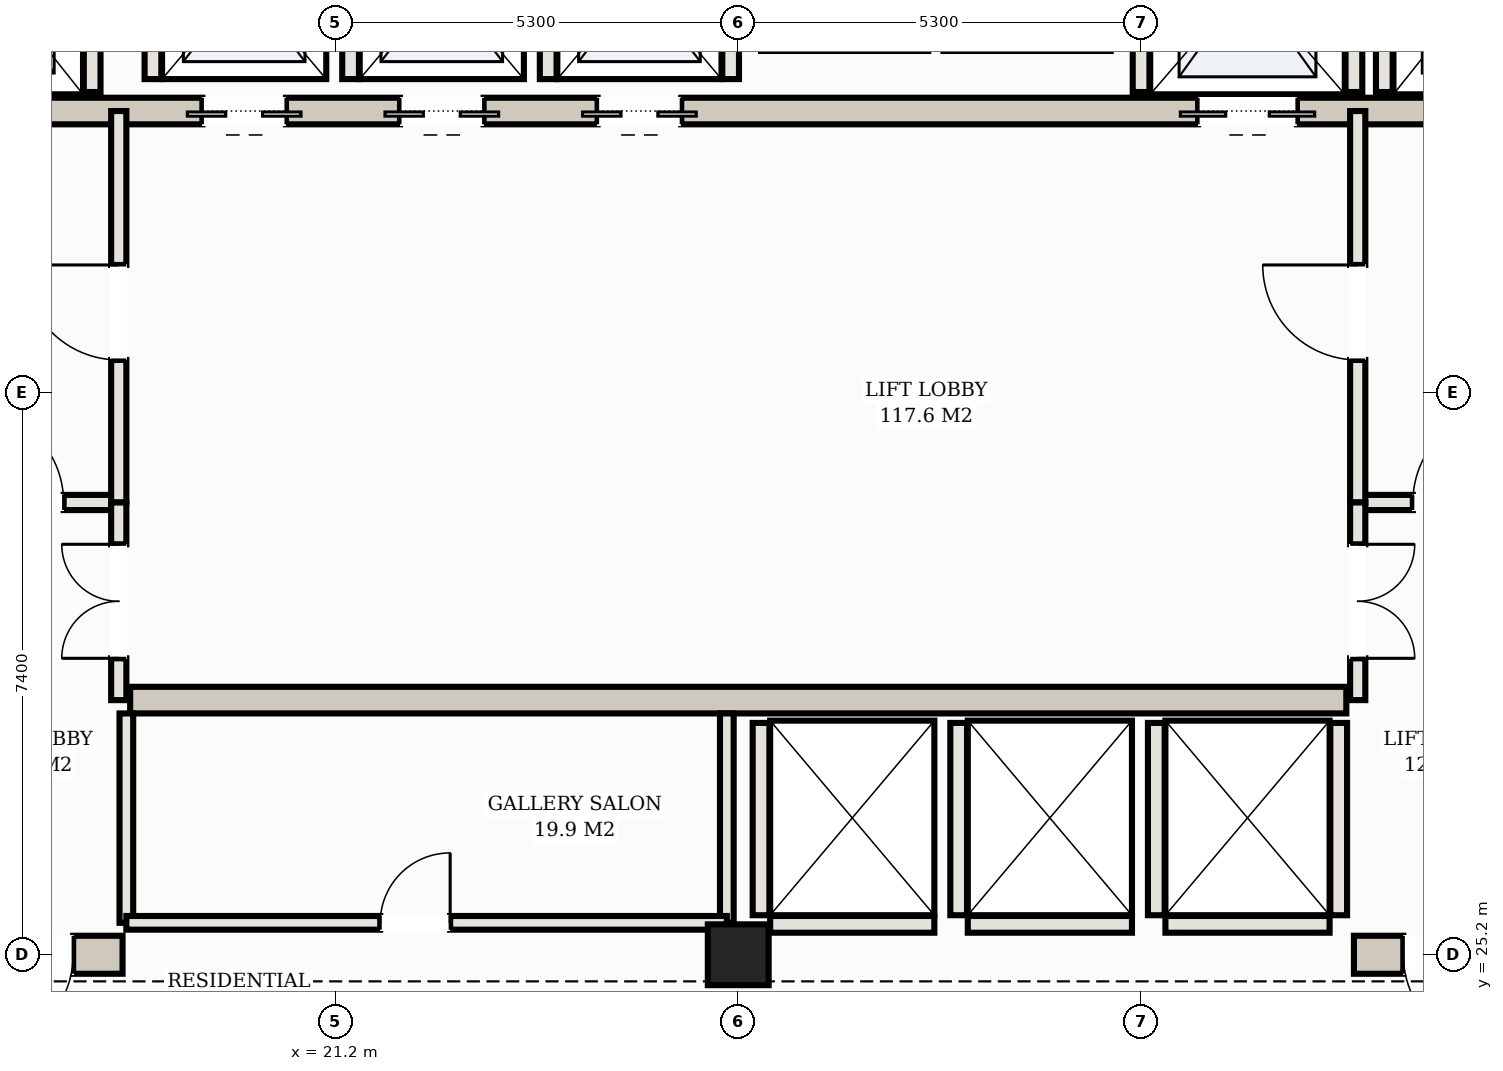
"""IFC4 building model, lengths in metres.
Left out: names, types, materials, properties, quantities, classifications, styles, units other than length and angle.
Written with IfcOpenShell. Run it as: python <this file> out.ifc"""

import sys

from ifc_helpers import new_model, si_unit, direction, frame, frame_2d, origin, origin_2d, place, context, subcontext, project, spatial, rectangle, hollow_rectangle, extrude, element, fill, save


model = new_model("IFC4")
c1 = context("Model", 3, precision=1e-05, world=origin(), true_north=direction((0.0, 1.0)))
c2 = subcontext(c1, "Body", "Model", "MODEL_VIEW")
j1 = project(units=[si_unit("LENGTHUNIT", "METRE"), si_unit("PLANEANGLEUNIT", "RADIAN")], contexts=[c1])
p1 = place(None, origin())
s1 = spatial("IfcSite", under=j1, at=p1, CompositionType="ELEMENT")
p2 = place(p1, origin())
s2 = spatial("IfcBuilding", under=s1, at=p2, CompositionType="ELEMENT")
p3 = place(p2, frame((0.0, 0.0, 196.7)))
s3 = spatial("IfcBuildingStorey", under=s2, at=p3, CompositionType="ELEMENT", Elevation=196.7)
p4 = place(p3, frame((10.35, 25.2, 0.0), z_axis=(0.0, 0.0, 1.0), x_axis=(1.0, 0.0, 0.0)))
e1 = element("IfcWall", 1, at=p4, inside=s3, PredefinedType="SHEAR", context=c2, shape_type="SweptSolid", body=[
    extrude(rectangle(XDim=8.05, YDim=0.5, at=frame_2d((4.025, 0.0))), origin(), (0.0, 0.0, 1.0), 3.11),
])
p5 = place(p4, frame((6.15, 0.0, 0.0)))
e2 = element("IfcOpeningElement", 2, at=p5, cuts=e1, PredefinedType="OPENING", context=c2, shape_type="SweptSolid", body=[
    extrude(rectangle(XDim=1.25, YDim=2.2, at=frame_2d((0.625, 1.1))), frame((0.0, 0.26, 0.0), z_axis=(0.0, -1.0, 0.0), x_axis=(1.0, 0.0, 0.0)), (0.0, 0.0, 1.0), 0.52),
])
p6 = place(p3, frame((34.6, 25.2, 0.0), z_axis=(0.0, 0.0, 1.0), x_axis=(1.0, 0.0, 0.0)))
e3 = element("IfcWall", 3, at=p6, inside=s3, PredefinedType="SHEAR", context=c2, shape_type="SweptSolid", body=[
    extrude(rectangle(XDim=8.05, YDim=0.5, at=frame_2d((4.025, 0.0))), origin(), (0.0, 0.0, 1.0), 3.11),
])
p7 = place(p6, frame((0.65, 0.0, 0.0)))
e4 = element("IfcOpeningElement", 4, at=p7, cuts=e3, PredefinedType="OPENING", context=c2, shape_type="SweptSolid", body=[
    extrude(rectangle(XDim=1.25, YDim=2.2, at=frame_2d((0.625, 1.1))), frame((0.0, 0.26, 0.0), z_axis=(0.0, -1.0, 0.0), x_axis=(1.0, 0.0, 0.0)), (0.0, 0.0, 1.0), 0.52),
])
p8 = place(p3, frame((15.5, 36.3, 0.0), z_axis=(0.0, 0.0, 1.0), x_axis=(1.0, 0.0, 0.0)))
e5 = element("IfcWall", 5, at=p8, inside=s3, PredefinedType="SHEAR", context=c2, shape_type="SweptSolid", body=[
    extrude(rectangle(XDim=22.0, YDim=0.35, at=frame_2d((11.0, 0.0))), origin(), (0.0, 0.0, 1.0), 3.11),
])
p9 = place(p8, frame((0.65, 0.0, 0.0)))
e6 = element("IfcOpeningElement", 6, at=p9, cuts=e5, PredefinedType="OPENING", context=c2, shape_type="SweptSolid", body=[
    extrude(rectangle(XDim=1.1, YDim=2.15, at=frame_2d((0.55, 1.075))), frame((0.0, 0.185, 0.0), z_axis=(0.0, -1.0, 0.0), x_axis=(1.0, 0.0, 0.0)), (0.0, 0.0, 1.0), 0.37),
])
p10 = place(p8, frame((20.25, 0.0, 0.0)))
e7 = element("IfcOpeningElement", 7, at=p10, cuts=e5, PredefinedType="OPENING", context=c2, shape_type="SweptSolid", body=[
    extrude(rectangle(XDim=1.1, YDim=2.15, at=frame_2d((0.55, 1.075))), frame((0.0, 0.185, 0.0), z_axis=(0.0, -1.0, 0.0), x_axis=(1.0, 0.0, 0.0)), (0.0, 0.0, 1.0), 0.37),
])
p11 = place(p8, frame((17.05, 0.0, 0.0)))
e8 = element("IfcOpeningElement", 8, at=p11, cuts=e5, PredefinedType="OPENING", context=c2, shape_type="SweptSolid", body=[
    extrude(rectangle(XDim=1.3, YDim=2.2, at=frame_2d((0.65, 1.1))), frame((0.0, 0.185, 0.0), z_axis=(0.0, -1.0, 0.0), x_axis=(1.0, 0.0, 0.0)), (0.0, 0.0, 1.0), 0.37),
])
p12 = place(p8, frame((3.95, 0.0, 0.0)))
e9 = element("IfcOpeningElement", 9, at=p12, cuts=e5, PredefinedType="OPENING", context=c2, shape_type="SweptSolid", body=[
    extrude(rectangle(XDim=1.1, YDim=2.15, at=frame_2d((0.55, 1.075))), frame((0.0, 0.185, 0.0), z_axis=(0.0, -1.0, 0.0), x_axis=(1.0, 0.0, 0.0)), (0.0, 0.0, 1.0), 0.37),
])
p13 = place(p8, frame((6.55, 0.0, 0.0)))
e10 = element("IfcOpeningElement", 10, at=p13, cuts=e5, PredefinedType="OPENING", context=c2, shape_type="SweptSolid", body=[
    extrude(rectangle(XDim=1.1, YDim=2.15, at=frame_2d((0.55, 1.075))), frame((0.0, 0.185, 0.0), z_axis=(0.0, -1.0, 0.0), x_axis=(1.0, 0.0, 0.0)), (0.0, 0.0, 1.0), 0.37),
])
p14 = place(p8, frame((9.15, 0.0, 0.0)))
e11 = element("IfcOpeningElement", 11, at=p14, cuts=e5, PredefinedType="OPENING", context=c2, shape_type="SweptSolid", body=[
    extrude(rectangle(XDim=1.1, YDim=2.15, at=frame_2d((0.55, 1.075))), frame((0.0, 0.185, 0.0), z_axis=(0.0, -1.0, 0.0), x_axis=(1.0, 0.0, 0.0)), (0.0, 0.0, 1.0), 0.37),
])
p15 = place(p3, frame((18.5, 28.55, 0.0), z_axis=(0.0, 0.0, 1.0), x_axis=(1.0, 0.0, 0.0)))
e12 = element("IfcWall", 12, at=p15, inside=s3, PredefinedType="SHEAR", context=c2, shape_type="SweptSolid", body=[
    extrude(rectangle(XDim=16.0, YDim=0.35, at=frame_2d((8.0, 0.0))), origin(), (0.0, 0.0, 1.0), 3.11),
])
p16 = place(p3, frame((26.5, 25.2, 0.0), z_axis=(0.0, 0.0, 1.0), x_axis=(1.0, 0.0, 0.0)))
e13 = element("IfcColumn", 13, at=p16, inside=s3, PredefinedType="COLUMN", context=c2, shape_type="SweptSolid", body=[
    extrude(hollow_rectangle(XDim=0.8, YDim=0.8, WallThickness=0.028, at=origin_2d()), origin(), (0.0, 0.0, 1.0), 3.3),
])
for number, where, z_axis, x_axis in (
    (14, (18.0, 36.55, 0.0), (0.0, 0.0, 1.0), (0.0, 1.0, 0.0)),
    (15, (35.0, 36.55, 0.0), (0.0, 0.0, 1.0), (0.0, 1.0, 0.0)),
    (16, (31.8, 36.55, 0.0), (0.0, 0.0, 1.0), (0.0, 1.0, 0.0)),
    (17, (34.6, 36.55, 0.0), (0.0, 0.0, 1.0), (0.0, 1.0, 0.0)),
):
    element("IfcWall", number, at=place(p3, frame(where, z_axis=z_axis, x_axis=x_axis)), inside=s3, PredefinedType="SOLIDWALL", context=c2, shape_type="SweptSolid", body=[
        extrude(rectangle(XDim=2.93, YDim=0.22, at=frame_2d((1.465, 0.0))), origin(), (0.0, 0.0, 1.0), 3.11),
    ])
p17 = place(p3, frame((26.8, 25.72, 0.0), z_axis=(0.0, 0.0, 1.0), x_axis=(0.0, 1.0, 0.0)))
e18 = element("IfcWall", 18, at=p17, inside=s3, PredefinedType="SOLIDWALL", context=c2, shape_type="SweptSolid", body=[
    extrude(rectangle(XDim=2.53, YDim=0.22, at=frame_2d((1.265, 0.0))), origin(), (0.0, 0.0, 1.0), 3.11),
])
p18 = place(p3, frame((26.92, 25.6, 0.0), z_axis=(0.0, 0.0, 1.0), x_axis=(1.0, 0.0, 0.0)))
e19 = element("IfcWall", 19, at=p18, inside=s3, PredefinedType="SOLIDWALL", context=c2, shape_type="SweptSolid", body=[
    extrude(rectangle(XDim=2.16, YDim=0.22, at=frame_2d((1.08, 0.0))), origin(), (0.0, 0.0, 1.0), 2.305),
])
p19 = place(p3, frame((29.4, 25.72, 0.0), z_axis=(0.0, 0.0, 1.0), x_axis=(0.0, 1.0, 0.0)))
e20 = element("IfcWall", 20, at=p19, inside=s3, PredefinedType="SOLIDWALL", context=c2, shape_type="SweptSolid", body=[
    extrude(rectangle(XDim=2.53, YDim=0.22, at=frame_2d((1.265, 0.0))), origin(), (0.0, 0.0, 1.0), 3.11),
])
p20 = place(p3, frame((29.52, 25.6, 0.0), z_axis=(0.0, 0.0, 1.0), x_axis=(1.0, 0.0, 0.0)))
e21 = element("IfcWall", 21, at=p20, inside=s3, PredefinedType="SOLIDWALL", context=c2, shape_type="SweptSolid", body=[
    extrude(rectangle(XDim=2.16, YDim=0.22, at=frame_2d((1.08, 0.0))), origin(), (0.0, 0.0, 1.0), 2.305),
])
for number, where, z_axis, x_axis in (
    (22, (32.0, 25.72, 0.0), (0.0, 0.0, 1.0), (0.0, 1.0, 0.0)),
    (23, (34.4, 25.72, 0.0), (0.0, 0.0, 1.0), (0.0, 1.0, 0.0)),
):
    element("IfcWall", number, at=place(p3, frame(where, z_axis=z_axis, x_axis=x_axis)), inside=s3, PredefinedType="SOLIDWALL", context=c2, shape_type="SweptSolid", body=[
        extrude(rectangle(XDim=2.53, YDim=0.22, at=frame_2d((1.265, 0.0))), origin(), (0.0, 0.0, 1.0), 3.11),
    ])
p21 = place(p3, frame((32.12, 25.6, 0.0), z_axis=(0.0, 0.0, 1.0), x_axis=(1.0, 0.0, 0.0)))
e24 = element("IfcWall", 24, at=p21, inside=s3, PredefinedType="SOLIDWALL", context=c2, shape_type="SweptSolid", body=[
    extrude(rectangle(XDim=2.16, YDim=0.22, at=frame_2d((1.08, 0.0))), origin(), (0.0, 0.0, 1.0), 2.305),
])
for number, where, z_axis, x_axis in (
    (25, (18.8, 36.72, 0.0), (0.0, 0.0, 1.0), (0.0, 1.0, 0.0)),
    (26, (21.4, 36.72, 0.0), (0.0, 0.0, 1.0), (0.0, 1.0, 0.0)),
    (27, (24.0, 36.72, 0.0), (0.0, 0.0, 1.0), (0.0, 1.0, 0.0)),
    (28, (26.4, 36.72, 0.0), (0.0, 0.0, 1.0), (0.0, 1.0, 0.0)),
):
    element("IfcWall", number, at=place(p3, frame(where, z_axis=z_axis, x_axis=x_axis)), inside=s3, PredefinedType="SOLIDWALL", context=c2, shape_type="SweptSolid", body=[
        extrude(rectangle(XDim=2.56, YDim=0.22, at=frame_2d((1.28, 0.0))), origin(), (0.0, 0.0, 1.0), 3.11),
    ])
p22 = place(p3, frame((15.1, 31.15, 0.0), z_axis=(0.0, 0.0, 1.0), x_axis=(1.0, 0.0, 0.0)))
e29 = element("IfcWall", 29, at=p22, inside=s3, PredefinedType="PARTITIONING", context=c2, shape_type="SweptSolid", body=[
    extrude(rectangle(XDim=3.25, YDim=0.2, at=frame_2d((1.625, 0.0))), origin(), (0.0, 0.0, 1.0), 2.43),
])
p23 = place(p22, frame((1.275, 0.0, 0.0)))
e30 = element("IfcOpeningElement", 30, at=p23, cuts=e29, PredefinedType="OPENING", context=c2, shape_type="SweptSolid", body=[
    extrude(rectangle(XDim=1.25, YDim=2.2, at=frame_2d((0.625, 1.1))), frame((0.0, 0.11, 0.0), z_axis=(0.0, -1.0, 0.0), x_axis=(1.0, 0.0, 0.0)), (0.0, 0.0, 1.0), 0.22),
])
p24 = place(p3, frame((18.35, 31.15, 0.0), z_axis=(0.0, 0.0, 1.0), x_axis=(0.0, 1.0, 0.0)))
e31 = element("IfcWall", 31, at=p24, inside=s3, PredefinedType="PARTITIONING", context=c2, shape_type="SweptSolid", body=[
    extrude(rectangle(XDim=5.15, YDim=0.2, at=frame_2d((2.575, 0.0))), origin(), (0.0, 0.0, 1.0), 2.43),
])
p25 = place(p24, frame((1.875, 0.0, 0.0)))
e32 = element("IfcOpeningElement", 32, at=p25, cuts=e31, PredefinedType="OPENING", context=c2, shape_type="SweptSolid", body=[
    extrude(rectangle(XDim=1.25, YDim=2.2, at=frame_2d((0.625, 1.1))), frame((0.0, 0.11, 0.0), z_axis=(0.0, -1.0, 0.0), x_axis=(1.0, 0.0, 0.0)), (0.0, 0.0, 1.0), 0.22),
])
p26 = place(p3, frame((34.65, 31.15, 0.0), z_axis=(0.0, 0.0, 1.0), x_axis=(1.0, 0.0, 0.0)))
e33 = element("IfcWall", 33, at=p26, inside=s3, PredefinedType="PARTITIONING", context=c2, shape_type="SweptSolid", body=[
    extrude(rectangle(XDim=3.25, YDim=0.2, at=frame_2d((1.625, 0.0))), origin(), (0.0, 0.0, 1.0), 2.43),
])
p27 = place(p26, frame((0.725, 0.0, 0.0)))
e34 = element("IfcOpeningElement", 34, at=p27, cuts=e33, PredefinedType="OPENING", context=c2, shape_type="SweptSolid", body=[
    extrude(rectangle(XDim=1.25, YDim=2.2, at=frame_2d((0.625, 1.1))), frame((0.0, 0.11, 0.0), z_axis=(0.0, -1.0, 0.0), x_axis=(1.0, 0.0, 0.0)), (0.0, 0.0, 1.0), 0.22),
])
p28 = place(p3, frame((34.65, 31.15, 0.0), z_axis=(0.0, 0.0, 1.0), x_axis=(0.0, 1.0, 0.0)))
e35 = element("IfcWall", 35, at=p28, inside=s3, PredefinedType="PARTITIONING", context=c2, shape_type="SweptSolid", body=[
    extrude(rectangle(XDim=5.15, YDim=0.2, at=frame_2d((2.575, 0.0))), origin(), (0.0, 0.0, 1.0), 2.43),
])
p29 = place(p28, frame((1.875, 0.0, 0.0)))
e36 = element("IfcOpeningElement", 36, at=p29, cuts=e35, PredefinedType="OPENING", context=c2, shape_type="SweptSolid", body=[
    extrude(rectangle(XDim=1.25, YDim=2.2, at=frame_2d((0.625, 1.1))), frame((0.0, 0.11, 0.0), z_axis=(0.0, -1.0, 0.0), x_axis=(1.0, 0.0, 0.0)), (0.0, 0.0, 1.0), 0.22),
])
p30 = place(p3, frame((18.35, 28.55, 0.0), z_axis=(0.0, 0.0, 1.0), x_axis=(0.0, 1.0, 0.0)))
e37 = element("IfcWall", 37, at=p30, inside=s3, PredefinedType="PARTITIONING", context=c2, shape_type="SweptSolid", body=[
    extrude(rectangle(XDim=2.6, YDim=0.2, at=frame_2d((1.3, 0.0))), origin(), (0.0, 0.0, 1.0), 2.43),
])
p31 = place(p30, frame((0.55, 0.0, 0.0)))
e38 = element("IfcOpeningElement", 38, at=p31, cuts=e37, PredefinedType="OPENING", context=c2, shape_type="SweptSolid", body=[
    extrude(rectangle(XDim=1.5, YDim=2.25, at=frame_2d((0.75, 1.125))), frame((0.0, 0.11, 0.0), z_axis=(0.0, -1.0, 0.0), x_axis=(1.0, 0.0, 0.0)), (0.0, 0.0, 1.0), 0.22),
])
p32 = place(p3, frame((34.65, 28.55, 0.0), z_axis=(0.0, 0.0, 1.0), x_axis=(0.0, 1.0, 0.0)))
e39 = element("IfcWall", 39, at=p32, inside=s3, PredefinedType="PARTITIONING", context=c2, shape_type="SweptSolid", body=[
    extrude(rectangle(XDim=2.6, YDim=0.2, at=frame_2d((1.3, 0.0))), origin(), (0.0, 0.0, 1.0), 2.43),
])
p33 = place(p32, frame((0.55, 0.0, 0.0)))
e40 = element("IfcOpeningElement", 40, at=p33, cuts=e39, PredefinedType="OPENING", context=c2, shape_type="SweptSolid", body=[
    extrude(rectangle(XDim=1.5, YDim=2.25, at=frame_2d((0.75, 1.125))), frame((0.0, 0.11, 0.0), z_axis=(0.0, -1.0, 0.0), x_axis=(1.0, 0.0, 0.0)), (0.0, 0.0, 1.0), 0.22),
])
for number, where, z_axis, x_axis in (
    (41, (18.45, 25.62, 0.0), (0.0, 0.0, 1.0), (0.0, 1.0, 0.0)),
    (42, (26.35, 25.62, 0.0), (0.0, 0.0, 1.0), (0.0, 1.0, 0.0)),
):
    element("IfcWall", number, at=place(p3, frame(where, z_axis=z_axis, x_axis=x_axis)), inside=s3, PredefinedType="PARTITIONING", context=c2, shape_type="SweptSolid", body=[
        extrude(rectangle(XDim=2.755, YDim=0.18, at=frame_2d((1.377, 0.0))), origin(), (0.0, 0.0, 1.0), 2.43),
    ])
p34 = place(p3, frame((18.45, 25.62, 0.0), z_axis=(0.0, 0.0, 1.0), x_axis=(1.0, 0.0, 0.0)))
e43 = element("IfcWall", 43, at=p34, inside=s3, PredefinedType="PARTITIONING", context=c2, shape_type="SweptSolid", body=[
    extrude(rectangle(XDim=7.9, YDim=0.18, at=frame_2d((3.95, 0.0))), origin(), (0.0, 0.0, 1.0), 2.43),
])
p35 = place(p34, frame((3.34, 0.0, 0.0)))
e44 = element("IfcOpeningElement", 44, at=p35, cuts=e43, PredefinedType="OPENING", context=c2, shape_type="SweptSolid", body=[
    extrude(rectangle(XDim=0.92, YDim=2.15, at=frame_2d((0.46, 1.075))), frame((0.0, 0.1, 0.0), z_axis=(0.0, -1.0, 0.0), x_axis=(1.0, 0.0, 0.0)), (0.0, 0.0, 1.0), 0.2),
])
p36 = place(p11, frame((1.3, 0.0, 0.0), z_axis=(0.0, 0.0, 1.0), x_axis=(-1.0, 0.0, 0.0)))
e45 = element("IfcDoor", 45, at=p36, inside=s3, OperationType="DOUBLE_DOOR_SLIDING", PredefinedType="DOOR", context=c2, shape_type="SweptSolid", body=[
    extrude(rectangle(XDim=1.3, YDim=2.2, at=frame_2d((0.65, 1.1))), frame((0.0, 0.025, 0.0), z_axis=(0.0, -1.0, 0.0), x_axis=(1.0, 0.0, 0.0)), (0.0, 0.0, 1.0), 0.05),
])
fill(e8, e45)
p37 = place(p12, frame((1.1, 0.0, 0.0), z_axis=(0.0, 0.0, 1.0), x_axis=(-1.0, 0.0, 0.0)))
e46 = element("IfcDoor", 46, at=p37, inside=s3, OperationType="DOUBLE_DOOR_SLIDING", PredefinedType="DOOR", context=c2, shape_type="SweptSolid", body=[
    extrude(rectangle(XDim=1.1, YDim=2.15, at=frame_2d((0.55, 1.075))), frame((0.0, 0.025, 0.0), z_axis=(0.0, -1.0, 0.0), x_axis=(1.0, 0.0, 0.0)), (0.0, 0.0, 1.0), 0.05),
])
fill(e9, e46)
p38 = place(p13, frame((1.1, 0.0, 0.0), z_axis=(0.0, 0.0, 1.0), x_axis=(-1.0, 0.0, 0.0)))
e47 = element("IfcDoor", 47, at=p38, inside=s3, OperationType="DOUBLE_DOOR_SLIDING", PredefinedType="DOOR", context=c2, shape_type="SweptSolid", body=[
    extrude(rectangle(XDim=1.1, YDim=2.15, at=frame_2d((0.55, 1.075))), frame((0.0, 0.025, 0.0), z_axis=(0.0, -1.0, 0.0), x_axis=(1.0, 0.0, 0.0)), (0.0, 0.0, 1.0), 0.05),
])
fill(e10, e47)
p39 = place(p14, frame((1.1, 0.0, 0.0), z_axis=(0.0, 0.0, 1.0), x_axis=(-1.0, 0.0, 0.0)))
e48 = element("IfcDoor", 48, at=p39, inside=s3, OperationType="DOUBLE_DOOR_SLIDING", PredefinedType="DOOR", context=c2, shape_type="SweptSolid", body=[
    extrude(rectangle(XDim=1.1, YDim=2.15, at=frame_2d((0.55, 1.075))), frame((0.0, 0.025, 0.0), z_axis=(0.0, -1.0, 0.0), x_axis=(1.0, 0.0, 0.0)), (0.0, 0.0, 1.0), 0.05),
])
fill(e11, e48)
p40 = place(p5, frame((1.25, 0.0, 0.0), z_axis=(0.0, 0.0, 1.0), x_axis=(-1.0, 0.0, 0.0)))
e49 = element("IfcDoor", 49, at=p40, inside=s3, OperationType="SINGLE_SWING_RIGHT", PredefinedType="DOOR", context=c2, shape_type="SweptSolid", body=[
    extrude(rectangle(XDim=1.25, YDim=2.2, at=frame_2d((0.625, 1.1))), frame((0.0, 0.025, 0.0), z_axis=(0.0, -1.0, 0.0), x_axis=(1.0, 0.0, 0.0)), (0.0, 0.0, 1.0), 0.05),
])
fill(e2, e49)
p41 = place(p7, frame((1.25, 0.0, 0.0), z_axis=(0.0, 0.0, 1.0), x_axis=(-1.0, 0.0, 0.0)))
e50 = element("IfcDoor", 50, at=p41, inside=s3, OperationType="SINGLE_SWING_LEFT", PredefinedType="DOOR", context=c2, shape_type="SweptSolid", body=[
    extrude(rectangle(XDim=1.25, YDim=2.2, at=frame_2d((0.625, 1.1))), frame((0.0, 0.025, 0.0), z_axis=(0.0, -1.0, 0.0), x_axis=(1.0, 0.0, 0.0)), (0.0, 0.0, 1.0), 0.05),
])
fill(e4, e50)
p42 = place(p23, origin())
e51 = element("IfcDoor", 51, at=p42, inside=s3, OperationType="SINGLE_SWING_LEFT", PredefinedType="DOOR", context=c2, shape_type="SweptSolid", body=[
    extrude(rectangle(XDim=1.25, YDim=2.2, at=frame_2d((0.625, 1.1))), frame((0.0, 0.025, 0.0), z_axis=(0.0, -1.0, 0.0), x_axis=(1.0, 0.0, 0.0)), (0.0, 0.0, 1.0), 0.05),
])
fill(e30, e51)
p43 = place(p25, origin())
e52 = element("IfcDoor", 52, at=p43, inside=s3, OperationType="SINGLE_SWING_RIGHT", PredefinedType="DOOR", context=c2, shape_type="SweptSolid", body=[
    extrude(rectangle(XDim=1.25, YDim=2.2, at=frame_2d((0.625, 1.1))), frame((0.0, 0.025, 0.0), z_axis=(0.0, -1.0, 0.0), x_axis=(1.0, 0.0, 0.0)), (0.0, 0.0, 1.0), 0.05),
])
fill(e32, e52)
p44 = place(p27, origin())
e53 = element("IfcDoor", 53, at=p44, inside=s3, OperationType="SINGLE_SWING_RIGHT", PredefinedType="DOOR", context=c2, shape_type="SweptSolid", body=[
    extrude(rectangle(XDim=1.25, YDim=2.2, at=frame_2d((0.625, 1.1))), frame((0.0, 0.025, 0.0), z_axis=(0.0, -1.0, 0.0), x_axis=(1.0, 0.0, 0.0)), (0.0, 0.0, 1.0), 0.05),
])
fill(e34, e53)
p45 = place(p29, origin())
e54 = element("IfcDoor", 54, at=p45, inside=s3, OperationType="SINGLE_SWING_RIGHT", PredefinedType="DOOR", context=c2, shape_type="SweptSolid", body=[
    extrude(rectangle(XDim=1.25, YDim=2.2, at=frame_2d((0.625, 1.1))), frame((0.0, 0.025, 0.0), z_axis=(0.0, -1.0, 0.0), x_axis=(1.0, 0.0, 0.0)), (0.0, 0.0, 1.0), 0.05),
])
fill(e36, e54)
p46 = place(p31, origin())
e55 = element("IfcDoor", 55, at=p46, inside=s3, OperationType="DOUBLE_DOOR_SINGLE_SWING", PredefinedType="DOOR", context=c2, shape_type="SweptSolid", body=[
    extrude(rectangle(XDim=1.5, YDim=2.25, at=frame_2d((0.75, 1.125))), frame((0.0, 0.025, 0.0), z_axis=(0.0, -1.0, 0.0), x_axis=(1.0, 0.0, 0.0)), (0.0, 0.0, 1.0), 0.05),
])
fill(e38, e55)
p47 = place(p33, frame((1.5, 0.0, 0.0), z_axis=(0.0, 0.0, 1.0), x_axis=(-1.0, 0.0, 0.0)))
e56 = element("IfcDoor", 56, at=p47, inside=s3, OperationType="DOUBLE_DOOR_SINGLE_SWING", PredefinedType="DOOR", context=c2, shape_type="SweptSolid", body=[
    extrude(rectangle(XDim=1.5, YDim=2.25, at=frame_2d((0.75, 1.125))), frame((0.0, 0.025, 0.0), z_axis=(0.0, -1.0, 0.0), x_axis=(1.0, 0.0, 0.0)), (0.0, 0.0, 1.0), 0.05),
])
fill(e40, e56)
p48 = place(p35, origin())
e57 = element("IfcDoor", 57, at=p48, inside=s3, OperationType="SINGLE_SWING_RIGHT", PredefinedType="DOOR", context=c2, shape_type="SweptSolid", body=[
    extrude(rectangle(XDim=0.92, YDim=2.15, at=frame_2d((0.46, 1.075))), frame((0.0, 0.025, 0.0), z_axis=(0.0, -1.0, 0.0), x_axis=(1.0, 0.0, 0.0)), (0.0, 0.0, 1.0), 0.05),
])
fill(e44, e57)
save(model, sys.argv[1])
